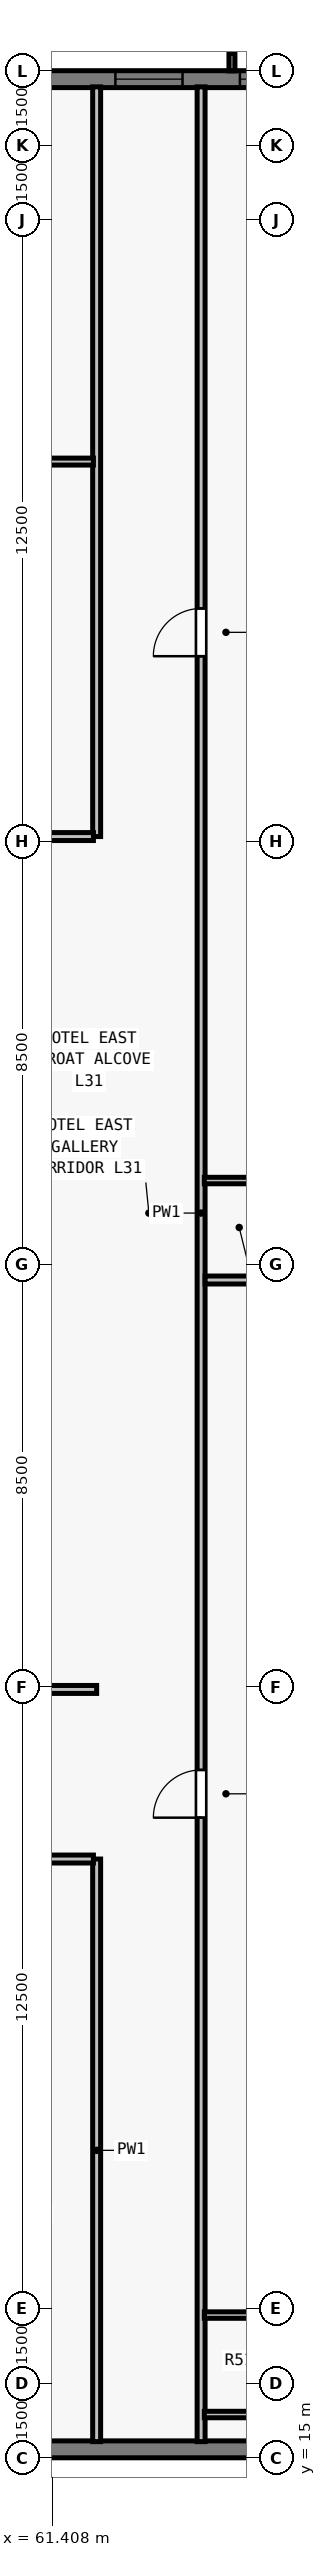
"""IFC4 building model, lengths in metres.
Left out: names, types, materials, properties, quantities, classifications, styles, units other than length and angle.
Written with IfcOpenShell. Run it as: python <this file> out.ifc"""

import sys

from ifc_helpers import new_model, si_unit, direction, frame, frame_2d, origin, place, context, subcontext, project, spatial, rectangle, extrude, element, fill, save


model = new_model("IFC4")
c1 = context("Model", 3, precision=1e-05, world=origin(), true_north=direction((0.0, 1.0)))
c2 = subcontext(c1, "Body", "Model", "MODEL_VIEW")
j1 = project(units=[si_unit("LENGTHUNIT", "METRE"), si_unit("PLANEANGLEUNIT", "RADIAN")], contexts=[c1])
p1 = place(None, origin())
s1 = spatial("IfcSite", under=j1, at=p1, CompositionType="ELEMENT")
p2 = place(p1, origin())
s2 = spatial("IfcBuilding", under=s1, at=p2, CompositionType="ELEMENT")
p3 = place(p2, frame((0.0, 0.0, 116.5)))
s3 = spatial("IfcBuildingStorey", under=s2, at=p3, CompositionType="ELEMENT", Elevation=116.5)
p4 = place(p3, frame((32.0, 62.83, 0.0), z_axis=(0.0, 0.0, 1.0), x_axis=(1.0, 0.0, 0.0)))
e1 = element("IfcWall", 1, at=p4, inside=s3, PredefinedType="SOLIDWALL", context=c2, shape_type="SweptSolid", body=[
    extrude(rectangle(XDim=39.682, YDim=0.34, at=frame_2d((19.841, 0.0))), origin(), (0.0, 0.0, 1.0), 3.28),
])
p5 = place(p4, frame((3.902, 0.0, 0.8)))
e2 = element("IfcOpeningElement", 2, at=p5, cuts=e1, PredefinedType="OPENING", context=c2, shape_type="SweptSolid", body=[
    extrude(rectangle(XDim=1.75, YDim=1.66, at=frame_2d((0.875, 0.83))), frame((0.0, 0.18, 0.0), z_axis=(0.0, -1.0, 0.0), x_axis=(1.0, 0.0, 0.0)), (0.0, 0.0, 1.0), 0.36),
])
p6 = place(p4, frame((8.505, 0.0, 0.8)))
e3 = element("IfcOpeningElement", 3, at=p6, cuts=e1, PredefinedType="OPENING", context=c2, shape_type="SweptSolid", body=[
    extrude(rectangle(XDim=1.35, YDim=1.66, at=frame_2d((0.675, 0.83))), frame((0.0, 0.18, 0.0), z_axis=(0.0, -1.0, 0.0), x_axis=(1.0, 0.0, 0.0)), (0.0, 0.0, 1.0), 0.36),
])
p7 = place(p4, frame((11.859, 0.0, 0.8)))
e4 = element("IfcOpeningElement", 4, at=p7, cuts=e1, PredefinedType="OPENING", context=c2, shape_type="SweptSolid", body=[
    extrude(rectangle(XDim=1.75, YDim=1.66, at=frame_2d((0.875, 0.83))), frame((0.0, 0.18, 0.0), z_axis=(0.0, -1.0, 0.0), x_axis=(1.0, 0.0, 0.0)), (0.0, 0.0, 1.0), 0.36),
])
p8 = place(p4, frame((16.062, 0.0, 0.8)))
e5 = element("IfcOpeningElement", 5, at=p8, cuts=e1, PredefinedType="OPENING", context=c2, shape_type="SweptSolid", body=[
    extrude(rectangle(XDim=1.35, YDim=1.66, at=frame_2d((0.675, 0.83))), frame((0.0, 0.18, 0.0), z_axis=(0.0, -1.0, 0.0), x_axis=(1.0, 0.0, 0.0)), (0.0, 0.0, 1.0), 0.36),
])
p9 = place(p4, frame((17.716, 0.0, 0.8)))
e6 = element("IfcOpeningElement", 6, at=p9, cuts=e1, PredefinedType="OPENING", context=c2, shape_type="SweptSolid", body=[
    extrude(rectangle(XDim=1.75, YDim=1.66, at=frame_2d((0.875, 0.83))), frame((0.0, 0.18, 0.0), z_axis=(0.0, -1.0, 0.0), x_axis=(1.0, 0.0, 0.0)), (0.0, 0.0, 1.0), 0.36),
])
p10 = place(p4, frame((22.719, 0.0, 0.8)))
e7 = element("IfcOpeningElement", 7, at=p10, cuts=e1, PredefinedType="OPENING", context=c2, shape_type="SweptSolid", body=[
    extrude(rectangle(XDim=1.35, YDim=1.66, at=frame_2d((0.675, 0.83))), frame((0.0, 0.18, 0.0), z_axis=(0.0, -1.0, 0.0), x_axis=(1.0, 0.0, 0.0)), (0.0, 0.0, 1.0), 0.36),
])
p11 = place(p4, frame((26.073, 0.0, 0.8)))
e8 = element("IfcOpeningElement", 8, at=p11, cuts=e1, PredefinedType="OPENING", context=c2, shape_type="SweptSolid", body=[
    extrude(rectangle(XDim=1.75, YDim=1.66, at=frame_2d((0.875, 0.83))), frame((0.0, 0.18, 0.0), z_axis=(0.0, -1.0, 0.0), x_axis=(1.0, 0.0, 0.0)), (0.0, 0.0, 1.0), 0.36),
])
p12 = place(p4, frame((30.677, 0.0, 0.8)))
e9 = element("IfcOpeningElement", 9, at=p12, cuts=e1, PredefinedType="OPENING", context=c2, shape_type="SweptSolid", body=[
    extrude(rectangle(XDim=1.35, YDim=1.66, at=frame_2d((0.675, 0.83))), frame((0.0, 0.18, 0.0), z_axis=(0.0, -1.0, 0.0), x_axis=(1.0, 0.0, 0.0)), (0.0, 0.0, 1.0), 0.36),
])
p13 = place(p4, frame((33.18, 0.0, 0.8)))
e10 = element("IfcOpeningElement", 10, at=p13, cuts=e1, PredefinedType="OPENING", context=c2, shape_type="SweptSolid", body=[
    extrude(rectangle(XDim=1.75, YDim=1.66, at=frame_2d((0.875, 0.83))), frame((0.0, 0.18, 0.0), z_axis=(0.0, -1.0, 0.0), x_axis=(1.0, 0.0, 0.0)), (0.0, 0.0, 1.0), 0.36),
])
p14 = place(p3, frame((72.0, 15.17, 0.0), z_axis=(0.0, 0.0, 1.0), x_axis=(-1.0, 0.0, 0.0)))
e11 = element("IfcWall", 11, at=p14, inside=s3, PredefinedType="SOLIDWALL", context=c2, shape_type="SweptSolid", body=[
    extrude(rectangle(XDim=39.682, YDim=0.34, at=frame_2d((19.841, 0.0))), origin(), (0.0, 0.0, 1.0), 3.28),
])
p15 = place(p14, frame((11.859, 0.0, 0.8)))
e12 = element("IfcOpeningElement", 12, at=p15, cuts=e11, PredefinedType="OPENING", context=c2, shape_type="SweptSolid", body=[
    extrude(rectangle(XDim=1.75, YDim=1.66, at=frame_2d((0.875, 0.83))), frame((0.0, 0.18, 0.0), z_axis=(0.0, -1.0, 0.0), x_axis=(1.0, 0.0, 0.0)), (0.0, 0.0, 1.0), 0.36),
])
p16 = place(p14, frame((16.062, 0.0, 0.8)))
e13 = element("IfcOpeningElement", 13, at=p16, cuts=e11, PredefinedType="OPENING", context=c2, shape_type="SweptSolid", body=[
    extrude(rectangle(XDim=1.35, YDim=1.66, at=frame_2d((0.675, 0.83))), frame((0.0, 0.18, 0.0), z_axis=(0.0, -1.0, 0.0), x_axis=(1.0, 0.0, 0.0)), (0.0, 0.0, 1.0), 0.36),
])
p17 = place(p14, frame((18.966, 0.0, 0.8)))
e14 = element("IfcOpeningElement", 14, at=p17, cuts=e11, PredefinedType="OPENING", context=c2, shape_type="SweptSolid", body=[
    extrude(rectangle(XDim=1.75, YDim=1.66, at=frame_2d((0.875, 0.83))), frame((0.0, 0.18, 0.0), z_axis=(0.0, -1.0, 0.0), x_axis=(1.0, 0.0, 0.0)), (0.0, 0.0, 1.0), 0.36),
])
p18 = place(p14, frame((21.469, 0.0, 0.8)))
e15 = element("IfcOpeningElement", 15, at=p18, cuts=e11, PredefinedType="OPENING", context=c2, shape_type="SweptSolid", body=[
    extrude(rectangle(XDim=1.35, YDim=1.66, at=frame_2d((0.675, 0.83))), frame((0.0, 0.18, 0.0), z_axis=(0.0, -1.0, 0.0), x_axis=(1.0, 0.0, 0.0)), (0.0, 0.0, 1.0), 0.36),
])
p19 = place(p14, frame((27.323, 0.0, 0.8)))
e16 = element("IfcOpeningElement", 16, at=p19, cuts=e11, PredefinedType="OPENING", context=c2, shape_type="SweptSolid", body=[
    extrude(rectangle(XDim=1.75, YDim=1.66, at=frame_2d((0.875, 0.83))), frame((0.0, 0.18, 0.0), z_axis=(0.0, -1.0, 0.0), x_axis=(1.0, 0.0, 0.0)), (0.0, 0.0, 1.0), 0.36),
])
p20 = place(p14, frame((29.827, 0.0, 0.8)))
e17 = element("IfcOpeningElement", 17, at=p20, cuts=e11, PredefinedType="OPENING", context=c2, shape_type="SweptSolid", body=[
    extrude(rectangle(XDim=1.35, YDim=1.66, at=frame_2d((0.675, 0.83))), frame((0.0, 0.18, 0.0), z_axis=(0.0, -1.0, 0.0), x_axis=(1.0, 0.0, 0.0)), (0.0, 0.0, 1.0), 0.36),
])
p21 = place(p14, frame((25.43, 0.0, 0.8)))
e18 = element("IfcOpeningElement", 18, at=p21, cuts=e11, PredefinedType="OPENING", context=c2, shape_type="SweptSolid", body=[
    extrude(rectangle(XDim=0.9, YDim=1.66, at=frame_2d((0.45, 0.83))), frame((0.0, 0.18, 0.0), z_axis=(0.0, -1.0, 0.0), x_axis=(1.0, 0.0, 0.0)), (0.0, 0.0, 1.0), 0.36),
])
p22 = place(p14, frame((34.39, 0.0, 0.8)))
e19 = element("IfcOpeningElement", 19, at=p22, cuts=e11, PredefinedType="OPENING", context=c2, shape_type="SweptSolid", body=[
    extrude(rectangle(XDim=0.9, YDim=1.66, at=frame_2d((0.45, 0.83))), frame((0.0, 0.18, 0.0), z_axis=(0.0, -1.0, 0.0), x_axis=(1.0, 0.0, 0.0)), (0.0, 0.0, 1.0), 0.36),
])
p23 = place(p3, frame((64.4, 15.325, 0.0), z_axis=(0.0, 0.0, 1.0), x_axis=(0.0, 1.0, 0.0)))
e20 = element("IfcWall", 20, at=p23, inside=s3, PredefinedType="PARTITIONING", context=c2, shape_type="SweptSolid", body=[
    extrude(rectangle(XDim=47.35, YDim=0.16, at=frame_2d((23.675, 0.0))), origin(), (0.0, 0.0, 1.0), 2.555),
])
p24 = place(p23, frame((12.547, 0.0, 0.0)))
e21 = element("IfcOpeningElement", 21, at=p24, cuts=e20, PredefinedType="OPENING", context=c2, shape_type="SweptSolid", body=[
    extrude(rectangle(XDim=0.96, YDim=2.15, at=frame_2d((0.48, 1.075))), frame((0.0, 0.09, 0.0), z_axis=(0.0, -1.0, 0.0), x_axis=(1.0, 0.0, 0.0)), (0.0, 0.0, 1.0), 0.18),
])
p25 = place(p23, frame((35.902, 0.0, 0.0)))
e22 = element("IfcOpeningElement", 22, at=p25, cuts=e20, PredefinedType="OPENING", context=c2, shape_type="SweptSolid", body=[
    extrude(rectangle(XDim=0.96, YDim=2.15, at=frame_2d((0.48, 1.075))), frame((0.0, 0.09, 0.0), z_axis=(0.0, -1.0, 0.0), x_axis=(1.0, 0.0, 0.0)), (0.0, 0.0, 1.0), 0.18),
])
p26 = place(p3, frame((62.3, 15.325, 0.0), z_axis=(0.0, 0.0, 1.0), x_axis=(0.0, 1.0, 0.0)))
e23 = element("IfcWall", 23, at=p26, inside=s3, PredefinedType="PARTITIONING", context=c2, shape_type="SweptSolid", body=[
    extrude(rectangle(XDim=11.715, YDim=0.16, at=frame_2d((5.857, 0.0))), origin(), (0.0, 0.0, 1.0), 3.28),
])
p27 = place(p3, frame((62.3, 47.6, 0.0), z_axis=(0.0, 0.0, 1.0), x_axis=(0.0, 1.0, 0.0)))
e24 = element("IfcWall", 24, at=p27, inside=s3, PredefinedType="PARTITIONING", context=c2, shape_type="SweptSolid", body=[
    extrude(rectangle(XDim=15.075, YDim=0.16, at=frame_2d((7.538, 0.0))), origin(), (0.0, 0.0, 1.0), 2.555),
])
p28 = place(p3, frame((60.765, 30.45, 0.0), z_axis=(0.0, 0.0, 1.0), x_axis=(1.0, 0.0, 0.0)))
e25 = element("IfcWall", 25, at=p28, inside=s3, PredefinedType="PARTITIONING", context=c2, shape_type="SweptSolid", body=[
    extrude(rectangle(XDim=1.535, YDim=0.16, at=frame_2d((0.768, 0.0))), origin(), (0.0, 0.0, 1.0), 3.28),
])
p29 = place(p3, frame((60.765, 47.6, 0.0), z_axis=(0.0, 0.0, 1.0), x_axis=(1.0, 0.0, 0.0)))
e26 = element("IfcWall", 26, at=p29, inside=s3, PredefinedType="PARTITIONING", context=c2, shape_type="SweptSolid", body=[
    extrude(rectangle(XDim=1.47, YDim=0.16, at=frame_2d((0.735, 0.0))), origin(), (0.0, 0.0, 1.0), 3.28),
])
p30 = place(p3, frame((40.165, 27.04, 0.0), z_axis=(0.0, 0.0, 1.0), x_axis=(1.0, 0.0, 0.0)))
e27 = element("IfcWall", 27, at=p30, inside=s3, PredefinedType="PARTITIONING", context=c2, shape_type="SweptSolid", body=[
    extrude(rectangle(XDim=22.07, YDim=0.16, at=frame_2d((11.035, 0.0))), origin(), (0.0, 0.0, 1.0), 3.28),
])
p31 = place(p30, frame((3.115, 0.0, 0.0)))
e28 = element("IfcOpeningElement", 28, at=p31, cuts=e27, PredefinedType="OPENING", context=c2, shape_type="SweptSolid", body=[
    extrude(rectangle(XDim=0.96, YDim=2.15, at=frame_2d((0.48, 1.075))), frame((0.0, 0.09, 0.0), z_axis=(0.0, -1.0, 0.0), x_axis=(1.0, 0.0, 0.0)), (0.0, 0.0, 1.0), 0.18),
])
p32 = place(p30, frame((5.372, 0.0, 0.0)))
e29 = element("IfcOpeningElement", 29, at=p32, cuts=e27, PredefinedType="OPENING", context=c2, shape_type="SweptSolid", body=[
    extrude(rectangle(XDim=0.96, YDim=2.15, at=frame_2d((0.48, 1.075))), frame((0.0, 0.09, 0.0), z_axis=(0.0, -1.0, 0.0), x_axis=(1.0, 0.0, 0.0)), (0.0, 0.0, 1.0), 0.18),
])
p33 = place(p30, frame((11.594, 0.0, 0.0)))
e30 = element("IfcOpeningElement", 30, at=p33, cuts=e27, PredefinedType="OPENING", context=c2, shape_type="SweptSolid", body=[
    extrude(rectangle(XDim=0.96, YDim=2.15, at=frame_2d((0.48, 1.075))), frame((0.0, 0.09, 0.0), z_axis=(0.0, -1.0, 0.0), x_axis=(1.0, 0.0, 0.0)), (0.0, 0.0, 1.0), 0.18),
])
p34 = place(p30, frame((14.188, 0.0, 0.0)))
e31 = element("IfcOpeningElement", 31, at=p34, cuts=e27, PredefinedType="OPENING", context=c2, shape_type="SweptSolid", body=[
    extrude(rectangle(XDim=0.96, YDim=2.15, at=frame_2d((0.48, 1.075))), frame((0.0, 0.09, 0.0), z_axis=(0.0, -1.0, 0.0), x_axis=(1.0, 0.0, 0.0)), (0.0, 0.0, 1.0), 0.18),
])
p35 = place(p30, frame((20.084, 0.0, 0.0)))
e32 = element("IfcOpeningElement", 32, at=p35, cuts=e27, PredefinedType="OPENING", context=c2, shape_type="SweptSolid", body=[
    extrude(rectangle(XDim=0.96, YDim=2.15, at=frame_2d((0.48, 1.075))), frame((0.0, 0.09, 0.0), z_axis=(0.0, -1.0, 0.0), x_axis=(1.0, 0.0, 0.0)), (0.0, 0.0, 1.0), 0.18),
])
p36 = place(p3, frame((40.165, 55.14, 0.0), z_axis=(0.0, 0.0, 1.0), x_axis=(1.0, 0.0, 0.0)))
e33 = element("IfcWall", 33, at=p36, inside=s3, PredefinedType="PARTITIONING", context=c2, shape_type="SweptSolid", body=[
    extrude(rectangle(XDim=22.07, YDim=0.14, at=frame_2d((11.035, 0.0))), origin(), (0.0, 0.0, 1.0), 3.28),
])
p37 = place(p36, frame((3.435, 0.0, 0.0)))
e34 = element("IfcOpeningElement", 34, at=p37, cuts=e33, PredefinedType="OPENING", context=c2, shape_type="SweptSolid", body=[
    extrude(rectangle(XDim=0.92, YDim=2.12, at=frame_2d((0.46, 1.06))), frame((0.0, 0.08, 0.0), z_axis=(0.0, -1.0, 0.0), x_axis=(1.0, 0.0, 0.0)), (0.0, 0.0, 1.0), 0.16),
])
p38 = place(p36, frame((14.435, 0.0, 0.0)))
e35 = element("IfcOpeningElement", 35, at=p38, cuts=e33, PredefinedType="OPENING", context=c2, shape_type="SweptSolid", body=[
    extrude(rectangle(XDim=0.92, YDim=2.12, at=frame_2d((0.46, 1.06))), frame((0.0, 0.08, 0.0), z_axis=(0.0, -1.0, 0.0), x_axis=(1.0, 0.0, 0.0)), (0.0, 0.0, 1.0), 0.16),
])
for number, where, z_axis, x_axis in (
    (36, (64.465, 15.87, 0.0), (0.0, 0.0, 1.0), (1.0, 0.0, 0.0)),
    (37, (64.465, 17.87, 0.0), (0.0, 0.0, 1.0), (1.0, 0.0, 0.0)),
):
    element("IfcWall", number, at=place(p3, frame(where, z_axis=z_axis, x_axis=x_axis)), inside=s3, PredefinedType="PLUMBINGWALL", context=c2, shape_type="SweptSolid", body=[
        extrude(rectangle(XDim=2.315, YDim=0.13, at=frame_2d((1.157, 0.0))), origin(), (0.0, 0.0, 1.0), 3.28),
    ])
p39 = place(p3, frame((64.48, 38.683, 0.0), z_axis=(0.0, 0.0, 1.0), x_axis=(1.0, 0.0, 0.0)))
e38 = element("IfcWall", 38, at=p39, inside=s3, PredefinedType="PARTITIONING", context=c2, shape_type="SweptSolid", body=[
    extrude(rectangle(XDim=11.195, YDim=0.16, at=frame_2d((5.598, 0.0))), origin(), (0.0, 0.0, 1.0), 3.28),
])
p40 = place(p3, frame((64.465, 40.683, 0.0), z_axis=(0.0, 0.0, 1.0), x_axis=(1.0, 0.0, 0.0)))
e39 = element("IfcWall", 39, at=p40, inside=s3, PredefinedType="PLUMBINGWALL", context=c2, shape_type="SweptSolid", body=[
    extrude(rectangle(XDim=2.315, YDim=0.13, at=frame_2d((1.157, 0.0))), origin(), (0.0, 0.0, 1.0), 3.28),
])
p41 = place(p12, origin())
e40 = element("IfcWindow", 40, at=p41, inside=s3, PartitioningType="SINGLE_PANEL", PredefinedType="WINDOW", context=c2, shape_type="SweptSolid", body=[
    extrude(rectangle(XDim=1.35, YDim=1.66, at=frame_2d((0.675, 0.83))), frame((0.0, -0.05, 0.0), z_axis=(0.0, -1.0, 0.0), x_axis=(1.0, 0.0, 0.0)), (0.0, 0.0, 1.0), 0.06),
])
fill(e9, e40)
p42 = place(p13, origin())
e41 = element("IfcWindow", 41, at=p42, inside=s3, PartitioningType="SINGLE_PANEL", PredefinedType="WINDOW", context=c2, shape_type="SweptSolid", body=[
    extrude(rectangle(XDim=1.75, YDim=1.66, at=frame_2d((0.875, 0.83))), frame((0.0, -0.05, 0.0), z_axis=(0.0, -1.0, 0.0), x_axis=(1.0, 0.0, 0.0)), (0.0, 0.0, 1.0), 0.06),
])
fill(e10, e41)
p43 = place(p24, origin())
e42 = element("IfcDoor", 42, at=p43, inside=s3, OperationType="SINGLE_SWING_LEFT", PredefinedType="DOOR", context=c2, shape_type="SweptSolid", body=[
    extrude(rectangle(XDim=0.96, YDim=2.15, at=frame_2d((0.48, 1.075))), frame((0.0, 0.025, 0.0), z_axis=(0.0, -1.0, 0.0), x_axis=(1.0, 0.0, 0.0)), (0.0, 0.0, 1.0), 0.05),
])
fill(e21, e42)
p44 = place(p25, origin())
e43 = element("IfcDoor", 43, at=p44, inside=s3, OperationType="SINGLE_SWING_LEFT", PredefinedType="DOOR", context=c2, shape_type="SweptSolid", body=[
    extrude(rectangle(XDim=0.96, YDim=2.15, at=frame_2d((0.48, 1.075))), frame((0.0, 0.025, 0.0), z_axis=(0.0, -1.0, 0.0), x_axis=(1.0, 0.0, 0.0)), (0.0, 0.0, 1.0), 0.05),
])
fill(e22, e43)
save(model, sys.argv[1])
